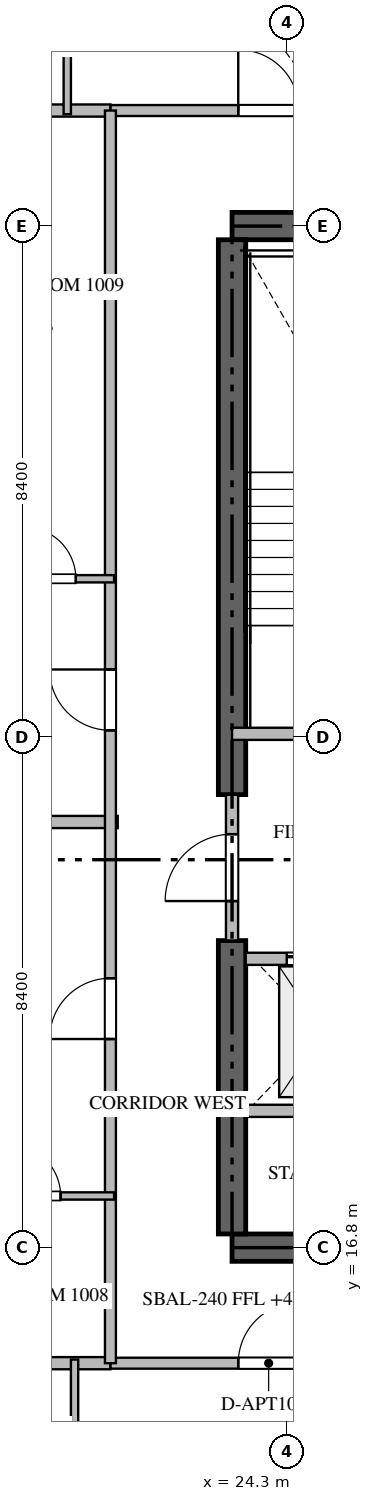
"""IFC4 building model, lengths in metres.
Left out: names, types, materials, properties, quantities, classifications, styles, units other than length and angle.
Written with IfcOpenShell. Run it as: python <this file> out.ifc"""

import sys

from ifc_helpers import new_model, si_unit, direction, frame, frame_2d, origin, place, context, subcontext, project, spatial, rectangle, extrude, source, transform, mapped, element, fill, save


model = new_model("IFC4")
c1 = context("Model", 3, precision=1e-05, world=origin(), true_north=direction((0.0, 1.0)))
c2 = subcontext(c1, "Body", "Model", "MODEL_VIEW")
j1 = project(units=[si_unit("LENGTHUNIT", "METRE"), si_unit("PLANEANGLEUNIT", "RADIAN")], contexts=[c1])
p1 = place(None, origin())
s1 = spatial("IfcSite", under=j1, at=p1, CompositionType="ELEMENT")
p2 = place(p1, origin())
s2 = spatial("IfcBuilding", under=s1, at=p2, CompositionType="ELEMENT")
p3 = place(p2, frame((0.0, 0.0, 45.45)))
s3 = spatial("IfcBuildingStorey", under=s2, at=p3, CompositionType="ELEMENT", Elevation=45.45)
for number, where, z_axis, x_axis in (
    (1, (23.4, 16.8, -0.26), (0.0, 0.0, 1.0), (1.0, 0.0, 0.0)),
    (2, (41.4, 33.6, -0.26), (0.0, 0.0, 1.0), (-1.0, 0.0, 0.0)),
):
    element("IfcWall", number, at=place(p3, frame(where, z_axis=z_axis, x_axis=x_axis)), inside=s3, PredefinedType="SHEAR", context=c2, shape_type="SweptSolid", body=[
        extrude(rectangle(XDim=18.0, YDim=0.45, at=frame_2d((9.0, 0.0))), origin(), (0.0, 0.0, 1.0), 3.748),
    ])
p4 = place(p3, frame((23.4, 17.025, -0.26), z_axis=(0.0, 0.0, 1.0), x_axis=(0.0, 1.0, 0.0)))
e3 = element("IfcWall", 3, at=p4, inside=s3, PredefinedType="SHEAR", context=c2, shape_type="SweptSolid", body=[
    extrude(rectangle(XDim=4.825, YDim=0.45, at=frame_2d((2.413, 0.0))), origin(), (0.0, 0.0, 1.0), 3.748),
])
p5 = place(p3, frame((23.4, 24.25, -0.26), z_axis=(0.0, 0.0, 1.0), x_axis=(0.0, 1.0, 0.0)))
e4 = element("IfcWall", 4, at=p5, inside=s3, PredefinedType="SHEAR", context=c2, shape_type="SweptSolid", body=[
    extrude(rectangle(XDim=9.125, YDim=0.45, at=frame_2d((4.562, 0.0))), origin(), (0.0, 0.0, 1.0), 3.748),
])
p6 = place(p3, frame((23.4, 25.25, 0.0), z_axis=(0.0, 0.0, 1.0), x_axis=(1.0, 0.0, 0.0)))
e5 = element("IfcWall", 5, at=p6, inside=s3, PredefinedType="STANDARD", context=c2, shape_type="SweptSolid", body=[
    extrude(rectangle(XDim=4.45, YDim=0.2, at=frame_2d((2.225, 0.0))), origin(), (0.0, 0.0, 1.0), 3.49),
])
p7 = place(p6, frame((1.65, 0.0, 0.0)))
e6 = element("IfcOpeningElement", 6, at=p7, cuts=e5, PredefinedType="OPENING", context=c2, shape_type="SweptSolid", body=[
    extrude(rectangle(XDim=1.1, YDim=2.15, at=frame_2d((0.55, 1.075))), frame((0.0, 0.11, 0.0), z_axis=(0.0, -1.0, 0.0), x_axis=(1.0, 0.0, 0.0)), (0.0, 0.0, 1.0), 0.22),
])
p8 = place(p3, frame((23.625, 21.55, 0.0), z_axis=(0.0, 0.0, 1.0), x_axis=(1.0, 0.0, 0.0)))
e7 = element("IfcWall", 7, at=p8, inside=s3, PredefinedType="STANDARD", context=c2, shape_type="SweptSolid", body=[
    extrude(rectangle(XDim=2.425, YDim=0.2, at=frame_2d((1.212, 0.0))), origin(), (0.0, 0.0, 1.0), 3.49),
])
p9 = place(p8, frame((0.675, 0.0, 0.0)))
e8 = element("IfcOpeningElement", 8, at=p9, cuts=e7, PredefinedType="OPENING", context=c2, shape_type="SweptSolid", body=[
    extrude(rectangle(XDim=1.2, YDim=2.2, at=frame_2d((0.6, 1.1))), frame((0.0, 0.11, 0.0), z_axis=(0.0, -1.0, 0.0), x_axis=(1.0, 0.0, 0.0)), (0.0, 0.0, 1.0), 0.22),
])
p10 = place(p3, frame((23.625, 19.05, 0.0), z_axis=(0.0, 0.0, 1.0), x_axis=(1.0, 0.0, 0.0)))
e9 = element("IfcWall", 9, at=p10, inside=s3, PredefinedType="STANDARD", context=c2, shape_type="SweptSolid", body=[
    extrude(rectangle(XDim=2.425, YDim=0.2, at=frame_2d((1.212, 0.0))), origin(), (0.0, 0.0, 1.0), 3.49),
])
p11 = place(p3, frame((23.4, 21.852, 0.0), z_axis=(0.0, 0.0, 1.0), x_axis=(0.0, 1.0, 0.0)))
e10 = element("IfcWall", 10, at=p11, inside=s3, PredefinedType="STANDARD", context=c2, shape_type="SweptSolid", body=[
    extrude(rectangle(XDim=2.396, YDim=0.2, at=frame_2d((1.198, 0.0))), origin(), (0.0, 0.0, 1.0), 3.49),
])
p12 = place(p11, frame((0.648, 0.0, 0.0)))
e11 = element("IfcOpeningElement", 11, at=p12, cuts=e10, PredefinedType="OPENING", context=c2, shape_type="SweptSolid", body=[
    extrude(rectangle(XDim=1.1, YDim=2.15, at=frame_2d((0.55, 1.075))), frame((0.0, 0.11, 0.0), z_axis=(0.0, -1.0, 0.0), x_axis=(1.0, 0.0, 0.0)), (0.0, 0.0, 1.0), 0.22),
])
p13 = place(p3, frame((6.082, 23.8, 0.0), z_axis=(0.0, 0.0, 1.0), x_axis=(1.0, 0.0, 0.0)))
e12 = element("IfcWall", 12, at=p13, inside=s3, PredefinedType="PARTITIONING", context=c2, shape_type="SweptSolid", body=[
    extrude(rectangle(XDim=15.438, YDim=0.2, at=frame_2d((7.719, 0.0))), origin(), (0.0, 0.0, 1.0), 3.49),
])
for number, where, z_axis, x_axis in (
    (13, (6.082, 14.9, 0.0), (0.0, 0.0, 1.0), (1.0, 0.0, 0.0)),
    (14, (6.082, 35.5, 0.0), (0.0, 0.0, 1.0), (1.0, 0.0, 0.0)),
):
    element("IfcWall", number, at=place(p3, frame(where, z_axis=z_axis, x_axis=x_axis)), inside=s3, PredefinedType="PARTITIONING", context=c2, shape_type="SweptSolid", body=[
        extrude(rectangle(XDim=15.318, YDim=0.2, at=frame_2d((7.659, 0.0))), origin(), (0.0, 0.0, 1.0), 3.49),
    ])
p14 = place(p3, frame((21.402, 14.9, 0.0), z_axis=(0.0, 0.0, 1.0), x_axis=(1.0, 0.0, 0.0)))
e15 = element("IfcWall", 15, at=p14, inside=s3, PredefinedType="PARTITIONING", context=c2, shape_type="SweptSolid", body=[
    extrude(rectangle(XDim=21.996, YDim=0.18, at=frame_2d((10.998, 0.0))), origin(), (0.0, 0.0, 1.0), 3.49),
])
p15 = place(p14, frame((2.1, 0.0, 0.0)))
e16 = element("IfcOpeningElement", 16, at=p15, cuts=e15, PredefinedType="OPENING", context=c2, shape_type="SweptSolid", body=[
    extrude(rectangle(XDim=1.0, YDim=2.15, at=frame_2d((0.5, 1.075))), frame((0.0, 0.1, 0.0), z_axis=(0.0, -1.0, 0.0), x_axis=(1.0, 0.0, 0.0)), (0.0, 0.0, 1.0), 0.2),
])
p16 = place(p14, frame((14.319, 0.0, 0.0)))
e17 = element("IfcOpeningElement", 17, at=p16, cuts=e15, PredefinedType="OPENING", context=c2, shape_type="SweptSolid", body=[
    extrude(rectangle(XDim=1.0, YDim=2.15, at=frame_2d((0.5, 1.075))), frame((0.0, 0.1, 0.0), z_axis=(0.0, -1.0, 0.0), x_axis=(1.0, 0.0, 0.0)), (0.0, 0.0, 1.0), 0.2),
])
p17 = place(p14, frame((18.896, 0.0, 0.0)))
e18 = element("IfcOpeningElement", 18, at=p17, cuts=e15, PredefinedType="OPENING", context=c2, shape_type="SweptSolid", body=[
    extrude(rectangle(XDim=1.0, YDim=2.15, at=frame_2d((0.5, 1.075))), frame((0.0, 0.1, 0.0), z_axis=(0.0, -1.0, 0.0), x_axis=(1.0, 0.0, 0.0)), (0.0, 0.0, 1.0), 0.2),
])
p18 = place(p3, frame((21.402, 35.5, 0.0), z_axis=(0.0, 0.0, 1.0), x_axis=(1.0, 0.0, 0.0)))
e19 = element("IfcWall", 19, at=p18, inside=s3, PredefinedType="PARTITIONING", context=c2, shape_type="SweptSolid", body=[
    extrude(rectangle(XDim=21.996, YDim=0.18, at=frame_2d((10.998, 0.0))), origin(), (0.0, 0.0, 1.0), 3.49),
])
p19 = place(p18, frame((2.1, 0.0, 0.0)))
e20 = element("IfcOpeningElement", 20, at=p19, cuts=e19, PredefinedType="OPENING", context=c2, shape_type="SweptSolid", body=[
    extrude(rectangle(XDim=1.0, YDim=2.15, at=frame_2d((0.5, 1.075))), frame((0.0, 0.1, 0.0), z_axis=(0.0, -1.0, 0.0), x_axis=(1.0, 0.0, 0.0)), (0.0, 0.0, 1.0), 0.2),
])
p20 = place(p18, frame((5.333, 0.0, 0.0)))
e21 = element("IfcOpeningElement", 21, at=p20, cuts=e19, PredefinedType="OPENING", context=c2, shape_type="SweptSolid", body=[
    extrude(rectangle(XDim=1.0, YDim=2.15, at=frame_2d((0.5, 1.075))), frame((0.0, 0.1, 0.0), z_axis=(0.0, -1.0, 0.0), x_axis=(1.0, 0.0, 0.0)), (0.0, 0.0, 1.0), 0.2),
])
p21 = place(p18, frame((11.842, 0.0, 0.0)))
e22 = element("IfcOpeningElement", 22, at=p21, cuts=e19, PredefinedType="OPENING", context=c2, shape_type="SweptSolid", body=[
    extrude(rectangle(XDim=1.0, YDim=2.15, at=frame_2d((0.5, 1.075))), frame((0.0, 0.1, 0.0), z_axis=(0.0, -1.0, 0.0), x_axis=(1.0, 0.0, 0.0)), (0.0, 0.0, 1.0), 0.2),
])
p22 = place(p18, frame((18.896, 0.0, 0.0)))
e23 = element("IfcOpeningElement", 23, at=p22, cuts=e19, PredefinedType="OPENING", context=c2, shape_type="SweptSolid", body=[
    extrude(rectangle(XDim=1.0, YDim=2.15, at=frame_2d((0.5, 1.075))), frame((0.0, 0.1, 0.0), z_axis=(0.0, -1.0, 0.0), x_axis=(1.0, 0.0, 0.0)), (0.0, 0.0, 1.0), 0.2),
])
p23 = place(p3, frame((21.4, 14.9, 0.0), z_axis=(0.0, 0.0, 1.0), x_axis=(0.0, 1.0, 0.0)))
e24 = element("IfcWall", 24, at=p23, inside=s3, PredefinedType="PARTITIONING", context=c2, shape_type="SweptSolid", body=[
    extrude(rectangle(XDim=20.6, YDim=0.18, at=frame_2d((10.3, 0.0))), origin(), (0.0, 0.0, 1.0), 3.49),
])
p24 = place(p23, frame((5.331, 0.0, 0.0)))
e25 = element("IfcOpeningElement", 25, at=p24, cuts=e24, PredefinedType="OPENING", context=c2, shape_type="SweptSolid", body=[
    extrude(rectangle(XDim=1.0, YDim=2.15, at=frame_2d((0.5, 1.075))), frame((0.0, 0.1, 0.0), z_axis=(0.0, -1.0, 0.0), x_axis=(1.0, 0.0, 0.0)), (0.0, 0.0, 1.0), 0.2),
])
p25 = place(p23, frame((10.408, 0.0, 0.0)))
e26 = element("IfcOpeningElement", 26, at=p25, cuts=e24, PredefinedType="OPENING", context=c2, shape_type="SweptSolid", body=[
    extrude(rectangle(XDim=1.0, YDim=2.15, at=frame_2d((0.5, 1.075))), frame((0.0, 0.1, 0.0), z_axis=(0.0, -1.0, 0.0), x_axis=(1.0, 0.0, 0.0)), (0.0, 0.0, 1.0), 0.2),
])
for number, where, z_axis, x_axis in (
    (27, (20.81, 12.15, 0.0), (0.0, 0.0, 1.0), (0.0, 1.0, 0.0)),
    (28, (20.69, 38.25, 0.0), (0.0, 0.0, 1.0), (0.0, -1.0, 0.0)),
):
    element("IfcWall", number, at=place(p3, frame(where, z_axis=z_axis, x_axis=x_axis)), inside=s3, PredefinedType="PARTITIONING", context=c2, shape_type="SweptSolid", body=[
        extrude(rectangle(XDim=2.81, YDim=0.12, at=frame_2d((1.405, 0.0))), origin(), (0.0, 0.0, 1.0), 3.49),
    ])
p26 = place(p3, frame((18.852, 17.65, 0.0), z_axis=(0.0, 0.0, 1.0), x_axis=(1.0, 0.0, 0.0)))
e29 = element("IfcWall", 29, at=p26, inside=s3, PredefinedType="PARTITIONING", context=c2, shape_type="SweptSolid", body=[
    extrude(rectangle(XDim=2.608, YDim=0.12, at=frame_2d((1.304, 0.0))), origin(), (0.0, 0.0, 1.0), 3.49),
])
p27 = place(p26, frame((0.879, 0.0, 0.0)))
e30 = element("IfcOpeningElement", 30, at=p27, cuts=e29, PredefinedType="OPENING", context=c2, shape_type="SweptSolid", body=[
    extrude(rectangle(XDim=0.85, YDim=2.1, at=frame_2d((0.425, 1.05))), frame((0.0, 0.07, 0.0), z_axis=(0.0, -1.0, 0.0), x_axis=(1.0, 0.0, 0.0)), (0.0, 0.0, 1.0), 0.14),
])
p28 = place(p3, frame((19.352, 27.8, 0.0), z_axis=(0.0, 0.0, 1.0), x_axis=(1.0, 0.0, 0.0)))
e31 = element("IfcWall", 31, at=p28, inside=s3, PredefinedType="PARTITIONING", context=c2, shape_type="SweptSolid", body=[
    extrude(rectangle(XDim=2.108, YDim=0.12, at=frame_2d((1.054, 0.0))), origin(), (0.0, 0.0, 1.0), 3.49),
])
p29 = place(p28, frame((0.629, 0.0, 0.0)))
e32 = element("IfcOpeningElement", 32, at=p29, cuts=e31, PredefinedType="OPENING", context=c2, shape_type="SweptSolid", body=[
    extrude(rectangle(XDim=0.85, YDim=2.1, at=frame_2d((0.425, 1.05))), frame((0.0, 0.07, 0.0), z_axis=(0.0, -1.0, 0.0), x_axis=(1.0, 0.0, 0.0)), (0.0, 0.0, 1.0), 0.14),
])
m1 = source(origin(), c2, "Body", "SweptSolid", [
    extrude(rectangle(XDim=1.2, YDim=2.2, at=frame_2d((0.6, 1.1))), frame((0.0, 0.025, 0.0), z_axis=(0.0, -1.0, 0.0), x_axis=(1.0, 0.0, 0.0)), (0.0, 0.0, 1.0), 0.05),
])
p30 = place(p9, origin())
e33 = element("IfcDoor", 33, at=p30, inside=s3, OperationType="DOUBLE_DOOR_SLIDING", PredefinedType="DOOR", context=c2, shape_type="MappedRepresentation", body=[
    mapped(m1, transform((0.0, 0.0, 0.0), scale=1.0)),
])
fill(e8, e33)
m2 = source(origin(), c2, "Body", "SweptSolid", [
    extrude(rectangle(XDim=1.1, YDim=2.15, at=frame_2d((0.55, 1.075))), frame((0.0, 0.025, 0.0), z_axis=(0.0, -1.0, 0.0), x_axis=(1.0, 0.0, 0.0)), (0.0, 0.0, 1.0), 0.05),
])
p31 = place(p12, origin())
e34 = element("IfcDoor", 34, at=p31, inside=s3, OperationType="SINGLE_SWING_LEFT", PredefinedType="DOOR", context=c2, shape_type="MappedRepresentation", body=[
    mapped(m2, transform((0.0, 0.0, 0.0), scale=1.0)),
])
fill(e11, e34)
m3 = source(origin(), c2, "Body", "SweptSolid", [
    extrude(rectangle(XDim=1.0, YDim=2.15, at=frame_2d((0.5, 1.075))), frame((0.0, 0.025, 0.0), z_axis=(0.0, -1.0, 0.0), x_axis=(1.0, 0.0, 0.0)), (0.0, 0.0, 1.0), 0.05),
])
p32 = place(p15, origin())
e35 = element("IfcDoor", 35, at=p32, inside=s3, OperationType="SINGLE_SWING_RIGHT", PredefinedType="DOOR", context=c2, shape_type="MappedRepresentation", body=[
    mapped(m3, transform((0.0, 0.0, 0.0), scale=1.0)),
])
fill(e16, e35)
p33 = place(p19, origin())
e36 = element("IfcDoor", 36, at=p33, inside=s3, OperationType="SINGLE_SWING_LEFT", PredefinedType="DOOR", context=c2, shape_type="MappedRepresentation", body=[
    mapped(m3, transform((0.0, 0.0, 0.0), scale=1.0)),
])
fill(e20, e36)
p34 = place(p24, origin())
e37 = element("IfcDoor", 37, at=p34, inside=s3, OperationType="SINGLE_SWING_LEFT", PredefinedType="DOOR", context=c2, shape_type="MappedRepresentation", body=[
    mapped(m3, transform((0.0, 0.0, 0.0), scale=1.0)),
])
fill(e25, e37)
p35 = place(p25, origin())
e38 = element("IfcDoor", 38, at=p35, inside=s3, OperationType="SINGLE_SWING_RIGHT", PredefinedType="DOOR", context=c2, shape_type="MappedRepresentation", body=[
    mapped(m3, transform((0.0, 0.0, 0.0), scale=1.0)),
])
fill(e26, e38)
m4 = source(origin(), c2, "Body", "SweptSolid", [
    extrude(rectangle(XDim=0.85, YDim=2.1, at=frame_2d((0.425, 1.05))), frame((0.0, 0.025, 0.0), z_axis=(0.0, -1.0, 0.0), x_axis=(1.0, 0.0, 0.0)), (0.0, 0.0, 1.0), 0.05),
])
p36 = place(p27, origin())
e39 = element("IfcDoor", 39, at=p36, inside=s3, OperationType="SINGLE_SWING_LEFT", PredefinedType="DOOR", context=c2, shape_type="MappedRepresentation", body=[
    mapped(m4, transform((0.0, 0.0, 0.0), scale=1.0)),
])
fill(e30, e39)
p37 = place(p29, origin())
e40 = element("IfcDoor", 40, at=p37, inside=s3, OperationType="SINGLE_SWING_LEFT", PredefinedType="DOOR", context=c2, shape_type="MappedRepresentation", body=[
    mapped(m4, transform((0.0, 0.0, 0.0), scale=1.0)),
])
fill(e32, e40)
save(model, sys.argv[1])
